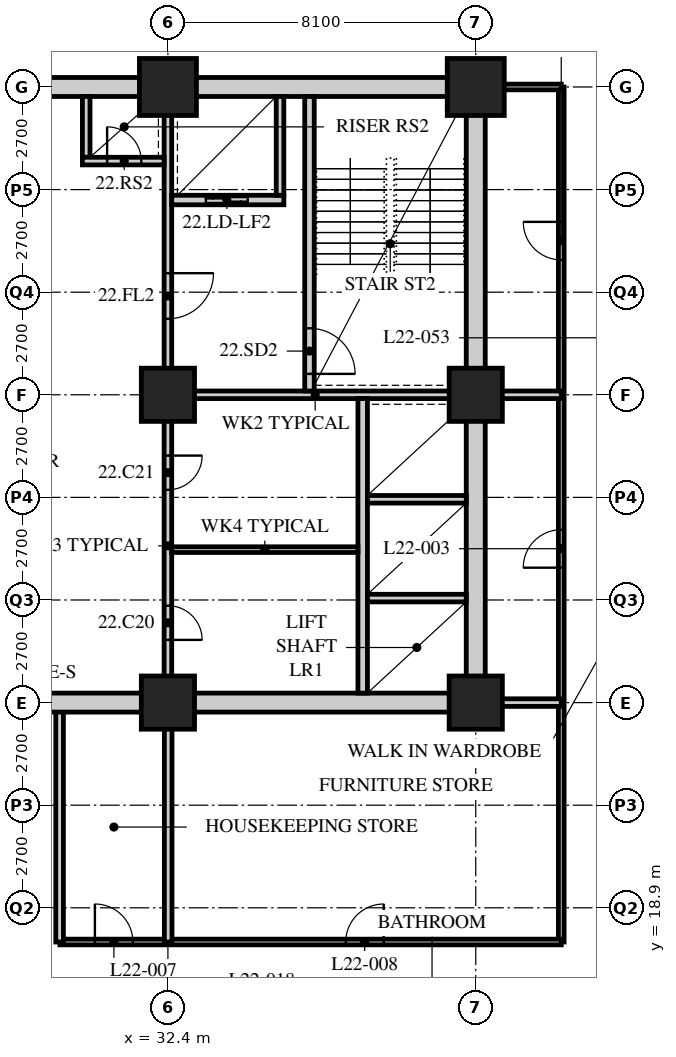
"""IFC4 building model, lengths in metres.
Left out: names, types, materials, properties, quantities, classifications, styles, units other than length and angle.
Written with IfcOpenShell. Run it as: python <this file> out.ifc"""

import sys

from ifc_helpers import new_model, si_unit, direction, frame, frame_2d, origin, origin_2d, place, context, subcontext, project, spatial, rectangle, hollow_rectangle, extrude, element, fill, save


model = new_model("IFC4")
c1 = context("Model", 3, precision=1e-05, world=origin(), true_north=direction((0.0, 1.0)))
c2 = subcontext(c1, "Body", "Model", "MODEL_VIEW")
j1 = project(units=[si_unit("LENGTHUNIT", "METRE"), si_unit("PLANEANGLEUNIT", "RADIAN")], contexts=[c1])
p1 = place(None, origin())
s1 = spatial("IfcSite", under=j1, at=p1, CompositionType="ELEMENT")
p2 = place(p1, origin())
s2 = spatial("IfcBuilding", under=s1, at=p2, CompositionType="ELEMENT")
p3 = place(p2, frame((0.0, 0.0, 87.4)))
s3 = spatial("IfcBuildingStorey", under=s2, at=p3, CompositionType="ELEMENT", Elevation=87.4)
for number, where, z_axis, x_axis in (
    (1, (32.4, 24.3, 0.0), (0.0, 0.0, 1.0), (1.0, 0.0, 0.0)),
    (2, (32.4, 32.4, 0.0), (0.0, 0.0, 1.0), (1.0, 0.0, 0.0)),
):
    element("IfcColumn", number, at=place(p3, frame(where, z_axis=z_axis, x_axis=x_axis)), inside=s3, PredefinedType="COLUMN", context=c2, shape_type="SweptSolid", body=[
        extrude(hollow_rectangle(XDim=1.4, YDim=1.4, WallThickness=0.12, at=origin_2d()), origin(), (0.0, 0.0, 1.0), 3.4),
    ])
p4 = place(p3, frame((32.4, 40.5, 0.0), z_axis=(0.0, 0.0, 1.0), x_axis=(1.0, 0.0, 0.0)))
e3 = element("IfcColumn", 3, at=p4, inside=s3, PredefinedType="COLUMN", context=c2, shape_type="SweptSolid", body=[
    extrude(hollow_rectangle(XDim=1.5, YDim=1.5, WallThickness=0.13, at=origin_2d()), origin(), (0.0, 0.0, 1.0), 3.4),
])
for number, where, z_axis, x_axis in (
    (4, (40.5, 24.3, 0.0), (0.0, 0.0, 1.0), (1.0, 0.0, 0.0)),
    (5, (40.5, 32.4, 0.0), (0.0, 0.0, 1.0), (1.0, 0.0, 0.0)),
):
    element("IfcColumn", number, at=place(p3, frame(where, z_axis=z_axis, x_axis=x_axis)), inside=s3, PredefinedType="COLUMN", context=c2, shape_type="SweptSolid", body=[
        extrude(hollow_rectangle(XDim=1.4, YDim=1.4, WallThickness=0.12, at=origin_2d()), origin(), (0.0, 0.0, 1.0), 3.4),
    ])
p5 = place(p3, frame((40.5, 40.5, 0.0), z_axis=(0.0, 0.0, 1.0), x_axis=(1.0, 0.0, 0.0)))
e6 = element("IfcColumn", 6, at=p5, inside=s3, PredefinedType="COLUMN", context=c2, shape_type="SweptSolid", body=[
    extrude(hollow_rectangle(XDim=1.5, YDim=1.5, WallThickness=0.13, at=origin_2d()), origin(), (0.0, 0.0, 1.0), 3.4),
])
p6 = place(p3, frame((42.75, 18.0, 0.0), z_axis=(0.0, 0.0, 1.0), x_axis=(0.0, 1.0, 0.0)))
e7 = element("IfcWall", 7, at=p6, inside=s3, PredefinedType="PARTITIONING", context=c2, shape_type="SweptSolid", body=[
    extrude(rectangle(XDim=22.5, YDim=0.15, at=frame_2d((11.25, 0.0))), origin(), (0.0, 0.0, 1.0), 3.15),
])
p7 = place(p6, frame((9.85, 0.0, 0.0)))
e8 = element("IfcOpeningElement", 8, at=p7, cuts=e7, PredefinedType="OPENING", context=c2, shape_type="SweptSolid", body=[
    extrude(rectangle(XDim=1.0, YDim=2.1, at=frame_2d((0.5, 1.05))), frame((0.0, 0.085, 0.0), z_axis=(0.0, -1.0, 0.0), x_axis=(1.0, 0.0, 0.0)), (0.0, 0.0, 1.0), 0.17),
])
p8 = place(p6, frame((17.95, 0.0, 0.0)))
e9 = element("IfcOpeningElement", 9, at=p8, cuts=e7, PredefinedType="OPENING", context=c2, shape_type="SweptSolid", body=[
    extrude(rectangle(XDim=1.0, YDim=2.1, at=frame_2d((0.5, 1.05))), frame((0.0, 0.085, 0.0), z_axis=(0.0, -1.0, 0.0), x_axis=(1.0, 0.0, 0.0)), (0.0, 0.0, 1.0), 0.17),
])
p9 = place(p3, frame((42.75, 40.5, 0.0), z_axis=(0.0, 0.0, 1.0), x_axis=(-1.0, 0.0, 0.0)))
e10 = element("IfcWall", 10, at=p9, inside=s3, PredefinedType="PARTITIONING", context=c2, shape_type="SweptSolid", body=[
    extrude(rectangle(XDim=2.05, YDim=0.15, at=frame_2d((1.025, 0.0))), origin(), (0.0, 0.0, 1.0), 2.05),
])
p10 = place(p3, frame((29.56, 18.0, 0.0), z_axis=(0.0, 0.0, 1.0), x_axis=(1.0, 0.0, 0.0)))
e11 = element("IfcWall", 11, at=p10, inside=s3, PredefinedType="PARTITIONING", context=c2, shape_type="SweptSolid", body=[
    extrude(rectangle(XDim=13.19, YDim=0.15, at=frame_2d((6.595, 0.0))), origin(), (0.0, 0.0, 1.0), 3.15),
])
p11 = place(p10, frame((0.919, 0.0, 0.0)))
e12 = element("IfcOpeningElement", 12, at=p11, cuts=e11, PredefinedType="OPENING", context=c2, shape_type="SweptSolid", body=[
    extrude(rectangle(XDim=1.0, YDim=2.1, at=frame_2d((0.5, 1.05))), frame((0.0, 0.085, 0.0), z_axis=(0.0, -1.0, 0.0), x_axis=(1.0, 0.0, 0.0)), (0.0, 0.0, 1.0), 0.17),
])
p12 = place(p10, frame((7.519, 0.0, 0.0)))
e13 = element("IfcOpeningElement", 13, at=p12, cuts=e11, PredefinedType="OPENING", context=c2, shape_type="SweptSolid", body=[
    extrude(rectangle(XDim=1.0, YDim=2.1, at=frame_2d((0.5, 1.05))), frame((0.0, 0.085, 0.0), z_axis=(0.0, -1.0, 0.0), x_axis=(1.0, 0.0, 0.0)), (0.0, 0.0, 1.0), 0.17),
])
p13 = place(p3, frame((40.5, 32.4, 0.0), z_axis=(0.0, 0.0, 1.0), x_axis=(1.0, 0.0, 0.0)))
e14 = element("IfcWall", 14, at=p13, inside=s3, PredefinedType="SOLIDWALL", context=c2, shape_type="SweptSolid", body=[
    extrude(rectangle(XDim=2.25, YDim=0.2, at=frame_2d((1.125, 0.0))), origin(), (0.0, 0.0, 1.0), 2.388),
])
p14 = place(p3, frame((32.407, 18.0, 0.0), z_axis=(0.0, 0.0, 1.0), x_axis=(0.0, 1.0, 0.0)))
e15 = element("IfcWall", 15, at=p14, inside=s3, PredefinedType="SOLIDWALL", context=c2, shape_type="SweptSolid", body=[
    extrude(rectangle(XDim=6.3, YDim=0.2, at=frame_2d((3.15, 0.0))), origin(), (0.0, 0.0, 1.0), 2.05),
])
p15 = place(p3, frame((29.55, 18.0, 0.0), z_axis=(0.0, 0.0, 1.0), x_axis=(0.0, 1.0, 0.0)))
e16 = element("IfcWall", 16, at=p15, inside=s3, PredefinedType="SOLIDWALL", context=c2, shape_type="SweptSolid", body=[
    extrude(rectangle(XDim=6.3, YDim=0.2, at=frame_2d((3.15, 0.0))), origin(), (0.0, 0.0, 1.0), 3.15),
])
p16 = place(p3, frame((40.5, 24.3, 0.0), z_axis=(0.0, 0.0, 1.0), x_axis=(1.0, 0.0, 0.0)))
e17 = element("IfcWall", 17, at=p16, inside=s3, PredefinedType="SOLIDWALL", context=c2, shape_type="SweptSolid", body=[
    extrude(rectangle(XDim=2.25, YDim=0.2, at=frame_2d((1.125, 0.0))), origin(), (0.0, 0.0, 1.0), 2.05),
])
p17 = place(p3, frame((24.3, 24.3, 0.0), z_axis=(0.0, 0.0, 1.0), x_axis=(1.0, 0.0, 0.0)))
e18 = element("IfcWall", 18, at=p17, inside=s3, PredefinedType="SOLIDWALL", context=c2, shape_type="SweptSolid", body=[
    extrude(rectangle(XDim=8.1, YDim=0.5, at=frame_2d((4.05, 0.0))), origin(), (0.0, 0.0, 1.0), 2.5),
])
p18 = place(p17, frame((3.15, 0.0, 0.0)))
e19 = element("IfcOpeningElement", 19, at=p18, cuts=e18, PredefinedType="OPENING", context=c2, shape_type="SweptSolid", body=[
    extrude(rectangle(XDim=1.8, YDim=2.4, at=frame_2d((0.9, 1.2))), frame((0.0, 0.26, 0.0), z_axis=(0.0, -1.0, 0.0), x_axis=(1.0, 0.0, 0.0)), (0.0, 0.0, 1.0), 0.52),
])
p19 = place(p3, frame((32.4, 24.3, 0.0), z_axis=(0.0, 0.0, 1.0), x_axis=(1.0, 0.0, 0.0)))
e20 = element("IfcWall", 20, at=p19, inside=s3, PredefinedType="SOLIDWALL", context=c2, shape_type="SweptSolid", body=[
    extrude(rectangle(XDim=8.35, YDim=0.5, at=frame_2d((4.175, 0.0))), origin(), (0.0, 0.0, 1.0), 2.388),
])
p20 = place(p3, frame((24.3, 40.5, 0.0), z_axis=(0.0, 0.0, 1.0), x_axis=(1.0, 0.0, 0.0)))
e21 = element("IfcWall", 21, at=p20, inside=s3, PredefinedType="SOLIDWALL", context=c2, shape_type="SweptSolid", body=[
    extrude(rectangle(XDim=8.1, YDim=0.5, at=frame_2d((4.05, 0.0))), origin(), (0.0, 0.0, 1.0), 2.5),
])
p21 = place(p20, frame((3.15, 0.0, 0.0)))
e22 = element("IfcOpeningElement", 22, at=p21, cuts=e21, PredefinedType="OPENING", context=c2, shape_type="SweptSolid", body=[
    extrude(rectangle(XDim=1.8, YDim=2.4, at=frame_2d((0.9, 1.2))), frame((0.0, 0.26, 0.0), z_axis=(0.0, -1.0, 0.0), x_axis=(1.0, 0.0, 0.0)), (0.0, 0.0, 1.0), 0.52),
])
p22 = place(p3, frame((32.4, 40.5, 0.0), z_axis=(0.0, 0.0, 1.0), x_axis=(1.0, 0.0, 0.0)))
e23 = element("IfcWall", 23, at=p22, inside=s3, PredefinedType="SOLIDWALL", context=c2, shape_type="SweptSolid", body=[
    extrude(rectangle(XDim=8.35, YDim=0.5, at=frame_2d((4.175, 0.0))), origin(), (0.0, 0.0, 1.0), 2.388),
])
p23 = place(p3, frame((40.5, 24.55, 0.0), z_axis=(0.0, 0.0, 1.0), x_axis=(0.0, 1.0, 0.0)))
e24 = element("IfcWall", 24, at=p23, inside=s3, PredefinedType="SOLIDWALL", context=c2, shape_type="SweptSolid", body=[
    extrude(rectangle(XDim=15.7, YDim=0.5, at=frame_2d((7.85, 0.0))), origin(), (0.0, 0.0, 1.0), 2.05),
])
p24 = place(p3, frame((32.3, 32.4, 0.0), z_axis=(0.0, 0.0, 1.0), x_axis=(1.0, 0.0, 0.0)))
e25 = element("IfcWall", 25, at=p24, inside=s3, PredefinedType="SOLIDWALL", context=c2, shape_type="SweptSolid", body=[
    extrude(rectangle(XDim=7.95, YDim=0.2, at=frame_2d((3.975, 0.0))), origin(), (0.0, 0.0, 1.0), 2.388),
])
p25 = place(p3, frame((32.4, 32.5, 0.0), z_axis=(0.0, 0.0, 1.0), x_axis=(0.0, 1.0, 0.0)))
e26 = element("IfcWall", 26, at=p25, inside=s3, PredefinedType="SOLIDWALL", context=c2, shape_type="SweptSolid", body=[
    extrude(rectangle(XDim=7.75, YDim=0.2, at=frame_2d((3.875, 0.0))), origin(), (0.0, 0.0, 1.0), 2.388),
])
p26 = place(p25, frame((1.9, 0.0, 0.0)))
e27 = element("IfcOpeningElement", 27, at=p26, cuts=e26, PredefinedType="OPENING", context=c2, shape_type="SweptSolid", body=[
    extrude(rectangle(XDim=1.2, YDim=2.1, at=frame_2d((0.6, 1.05))), frame((0.0, 0.11, 0.0), z_axis=(0.0, -1.0, 0.0), x_axis=(1.0, 0.0, 0.0)), (0.0, 0.0, 1.0), 0.22),
])
p27 = place(p3, frame((37.525, 24.55, 0.0), z_axis=(0.0, 0.0, 1.0), x_axis=(0.0, 1.0, 0.0)))
e28 = element("IfcWall", 28, at=p27, inside=s3, PredefinedType="SOLIDWALL", context=c2, shape_type="SweptSolid", body=[
    extrude(rectangle(XDim=7.75, YDim=0.25, at=frame_2d((3.875, 0.0))), origin(), (0.0, 0.0, 1.0), 3.15),
])
for number, where, z_axis, x_axis in (
    (29, (37.65, 27.05, 0.0), (0.0, 0.0, 1.0), (1.0, 0.0, 0.0)),
    (30, (37.65, 29.65, 0.0), (0.0, 0.0, 1.0), (1.0, 0.0, 0.0)),
):
    element("IfcWall", number, at=place(p3, frame(where, z_axis=z_axis, x_axis=x_axis)), inside=s3, PredefinedType="SOLIDWALL", context=c2, shape_type="SweptSolid", body=[
        extrude(rectangle(XDim=2.6, YDim=0.2, at=frame_2d((1.3, 0.0))), origin(), (0.0, 0.0, 1.0), 3.15),
    ])
p28 = place(p3, frame((36.125, 32.5, 0.0), z_axis=(0.0, 0.0, 1.0), x_axis=(0.0, 1.0, 0.0)))
e31 = element("IfcWall", 31, at=p28, inside=s3, PredefinedType="SOLIDWALL", context=c2, shape_type="SweptSolid", body=[
    extrude(rectangle(XDim=7.75, YDim=0.25, at=frame_2d((3.875, 0.0))), origin(), (0.0, 0.0, 1.0), 3.15),
])
p29 = place(p28, frame((0.45, 0.0, 0.0)))
e32 = element("IfcOpeningElement", 32, at=p29, cuts=e31, PredefinedType="OPENING", context=c2, shape_type="SweptSolid", body=[
    extrude(rectangle(XDim=1.2, YDim=2.1, at=frame_2d((0.6, 1.05))), frame((0.0, 0.135, 0.0), z_axis=(0.0, -1.0, 0.0), x_axis=(1.0, 0.0, 0.0)), (0.0, 0.0, 1.0), 0.27),
])
p30 = place(p3, frame((32.5, 37.525, 0.0), z_axis=(0.0, 0.0, 1.0), x_axis=(1.0, 0.0, 0.0)))
e33 = element("IfcWall", 33, at=p30, inside=s3, PredefinedType="SOLIDWALL", context=c2, shape_type="SweptSolid", body=[
    extrude(rectangle(XDim=2.95, YDim=0.25, at=frame_2d((1.475, 0.0))), origin(), (0.0, 0.0, 1.0), 3.15),
])
p31 = place(p30, frame((0.9, 0.0, 0.0)))
e34 = element("IfcOpeningElement", 34, at=p31, cuts=e33, PredefinedType="OPENING", context=c2, shape_type="SweptSolid", body=[
    extrude(rectangle(XDim=1.1, YDim=2.4, at=frame_2d((0.55, 1.2))), frame((0.0, 0.135, 0.0), z_axis=(0.0, -1.0, 0.0), x_axis=(1.0, 0.0, 0.0)), (0.0, 0.0, 1.0), 0.27),
])
p32 = place(p3, frame((35.35, 37.65, 0.0), z_axis=(0.0, 0.0, 1.0), x_axis=(0.0, 1.0, 0.0)))
e35 = element("IfcWall", 35, at=p32, inside=s3, PredefinedType="SOLIDWALL", context=c2, shape_type="SweptSolid", body=[
    extrude(rectangle(XDim=2.6, YDim=0.2, at=frame_2d((1.3, 0.0))), origin(), (0.0, 0.0, 1.0), 3.15),
])
p33 = place(p3, frame((30.25, 38.65, 0.0), z_axis=(0.0, 0.0, 1.0), x_axis=(0.0, 1.0, 0.0)))
e36 = element("IfcWall", 36, at=p33, inside=s3, PredefinedType="SOLIDWALL", context=c2, shape_type="SweptSolid", body=[
    extrude(rectangle(XDim=1.6, YDim=0.2, at=frame_2d((0.8, 0.0))), origin(), (0.0, 0.0, 1.0), 3.15),
])
p34 = place(p3, frame((30.15, 38.55, 0.0), z_axis=(0.0, 0.0, 1.0), x_axis=(1.0, 0.0, 0.0)))
e37 = element("IfcWall", 37, at=p34, inside=s3, PredefinedType="SOLIDWALL", context=c2, shape_type="SweptSolid", body=[
    extrude(rectangle(XDim=2.15, YDim=0.2, at=frame_2d((1.075, 0.0))), origin(), (0.0, 0.0, 1.0), 3.15),
])
p35 = place(p34, frame((0.65, 0.0, 0.0)))
e38 = element("IfcOpeningElement", 38, at=p35, cuts=e37, PredefinedType="OPENING", context=c2, shape_type="SweptSolid", body=[
    extrude(rectangle(XDim=0.9, YDim=2.1, at=frame_2d((0.45, 1.05))), frame((0.0, 0.11, 0.0), z_axis=(0.0, -1.0, 0.0), x_axis=(1.0, 0.0, 0.0)), (0.0, 0.0, 1.0), 0.22),
])
p36 = place(p3, frame((32.4, 24.55, 0.0), z_axis=(0.0, 0.0, 1.0), x_axis=(0.0, 1.0, 0.0)))
e39 = element("IfcWall", 39, at=p36, inside=s3, PredefinedType="PARTITIONING", context=c2, shape_type="SweptSolid", body=[
    extrude(rectangle(XDim=7.75, YDim=0.2, at=frame_2d((3.875, 0.0))), origin(), (0.0, 0.0, 1.0), 2.388),
])
p37 = place(p36, frame((1.4, 0.0, 0.0)))
e40 = element("IfcOpeningElement", 40, at=p37, cuts=e39, PredefinedType="OPENING", context=c2, shape_type="SweptSolid", body=[
    extrude(rectangle(XDim=0.9, YDim=2.1, at=frame_2d((0.45, 1.05))), frame((0.0, 0.11, 0.0), z_axis=(0.0, -1.0, 0.0), x_axis=(1.0, 0.0, 0.0)), (0.0, 0.0, 1.0), 0.22),
])
p38 = place(p36, frame((5.35, 0.0, 0.0)))
e41 = element("IfcOpeningElement", 41, at=p38, cuts=e39, PredefinedType="OPENING", context=c2, shape_type="SweptSolid", body=[
    extrude(rectangle(XDim=0.9, YDim=2.1, at=frame_2d((0.45, 1.05))), frame((0.0, 0.11, 0.0), z_axis=(0.0, -1.0, 0.0), x_axis=(1.0, 0.0, 0.0)), (0.0, 0.0, 1.0), 0.22),
])
p39 = place(p3, frame((32.5, 28.325, 0.0), z_axis=(0.0, 0.0, 1.0), x_axis=(1.0, 0.0, 0.0)))
e42 = element("IfcWall", 42, at=p39, inside=s3, PredefinedType="PARTITIONING", context=c2, shape_type="SweptSolid", body=[
    extrude(rectangle(XDim=4.9, YDim=0.15, at=frame_2d((2.45, 0.0))), origin(), (0.0, 0.0, 1.0), 3.15),
])
p40 = place(p7, origin())
e43 = element("IfcDoor", 43, at=p40, inside=s3, OperationType="SINGLE_SWING_LEFT", PredefinedType="DOOR", context=c2, shape_type="SweptSolid", body=[
    extrude(rectangle(XDim=1.0, YDim=2.1, at=frame_2d((0.5, 1.05))), frame((0.0, 0.025, 0.0), z_axis=(0.0, -1.0, 0.0), x_axis=(1.0, 0.0, 0.0)), (0.0, 0.0, 1.0), 0.05),
])
fill(e8, e43)
p41 = place(p8, origin())
e44 = element("IfcDoor", 44, at=p41, inside=s3, OperationType="SINGLE_SWING_RIGHT", PredefinedType="DOOR", context=c2, shape_type="SweptSolid", body=[
    extrude(rectangle(XDim=1.0, YDim=2.1, at=frame_2d((0.5, 1.05))), frame((0.0, 0.025, 0.0), z_axis=(0.0, -1.0, 0.0), x_axis=(1.0, 0.0, 0.0)), (0.0, 0.0, 1.0), 0.05),
])
fill(e9, e44)
p42 = place(p11, origin())
e45 = element("IfcDoor", 45, at=p42, inside=s3, OperationType="SINGLE_SWING_LEFT", PredefinedType="DOOR", context=c2, shape_type="SweptSolid", body=[
    extrude(rectangle(XDim=1.0, YDim=2.1, at=frame_2d((0.5, 1.05))), frame((0.0, 0.025, 0.0), z_axis=(0.0, -1.0, 0.0), x_axis=(1.0, 0.0, 0.0)), (0.0, 0.0, 1.0), 0.05),
])
fill(e12, e45)
p43 = place(p12, origin())
e46 = element("IfcDoor", 46, at=p43, inside=s3, OperationType="SINGLE_SWING_RIGHT", PredefinedType="DOOR", context=c2, shape_type="SweptSolid", body=[
    extrude(rectangle(XDim=1.0, YDim=2.1, at=frame_2d((0.5, 1.05))), frame((0.0, 0.025, 0.0), z_axis=(0.0, -1.0, 0.0), x_axis=(1.0, 0.0, 0.0)), (0.0, 0.0, 1.0), 0.05),
])
fill(e13, e46)
p44 = place(p37, origin())
e47 = element("IfcDoor", 47, at=p44, inside=s3, OperationType="SINGLE_SWING_RIGHT", PredefinedType="DOOR", context=c2, shape_type="SweptSolid", body=[
    extrude(rectangle(XDim=0.9, YDim=2.1, at=frame_2d((0.45, 1.05))), frame((0.0, 0.025, 0.0), z_axis=(0.0, -1.0, 0.0), x_axis=(1.0, 0.0, 0.0)), (0.0, 0.0, 1.0), 0.05),
])
fill(e40, e47)
p45 = place(p38, origin())
e48 = element("IfcDoor", 48, at=p45, inside=s3, OperationType="SINGLE_SWING_LEFT", PredefinedType="DOOR", context=c2, shape_type="SweptSolid", body=[
    extrude(rectangle(XDim=0.9, YDim=2.1, at=frame_2d((0.45, 1.05))), frame((0.0, 0.025, 0.0), z_axis=(0.0, -1.0, 0.0), x_axis=(1.0, 0.0, 0.0)), (0.0, 0.0, 1.0), 0.05),
])
fill(e41, e48)
p46 = place(p29, origin())
e49 = element("IfcDoor", 49, at=p46, inside=s3, OperationType="SINGLE_SWING_RIGHT", PredefinedType="DOOR", context=c2, shape_type="SweptSolid", body=[
    extrude(rectangle(XDim=1.2, YDim=2.1, at=frame_2d((0.6, 1.05))), frame((0.0, 0.025, 0.0), z_axis=(0.0, -1.0, 0.0), x_axis=(1.0, 0.0, 0.0)), (0.0, 0.0, 1.0), 0.05),
])
fill(e32, e49)
p47 = place(p26, origin())
e50 = element("IfcDoor", 50, at=p47, inside=s3, OperationType="SINGLE_SWING_LEFT", PredefinedType="DOOR", context=c2, shape_type="SweptSolid", body=[
    extrude(rectangle(XDim=1.2, YDim=2.1, at=frame_2d((0.6, 1.05))), frame((0.0, 0.025, 0.0), z_axis=(0.0, -1.0, 0.0), x_axis=(1.0, 0.0, 0.0)), (0.0, 0.0, 1.0), 0.05),
])
fill(e27, e50)
p48 = place(p35, origin())
e51 = element("IfcDoor", 51, at=p48, inside=s3, OperationType="SINGLE_SWING_LEFT", PredefinedType="DOOR", context=c2, shape_type="SweptSolid", body=[
    extrude(rectangle(XDim=0.9, YDim=2.1, at=frame_2d((0.45, 1.05))), frame((0.0, 0.025, 0.0), z_axis=(0.0, -1.0, 0.0), x_axis=(1.0, 0.0, 0.0)), (0.0, 0.0, 1.0), 0.05),
])
fill(e38, e51)
p49 = place(p31, origin())
e52 = element("IfcDoor", 52, at=p49, inside=s3, OperationType="DOUBLE_DOOR_SLIDING", PredefinedType="DOOR", context=c2, shape_type="SweptSolid", body=[
    extrude(rectangle(XDim=1.1, YDim=2.4, at=frame_2d((0.55, 1.2))), frame((0.0, 0.025, 0.0), z_axis=(0.0, -1.0, 0.0), x_axis=(1.0, 0.0, 0.0)), (0.0, 0.0, 1.0), 0.05),
])
fill(e34, e52)
save(model, sys.argv[1])
